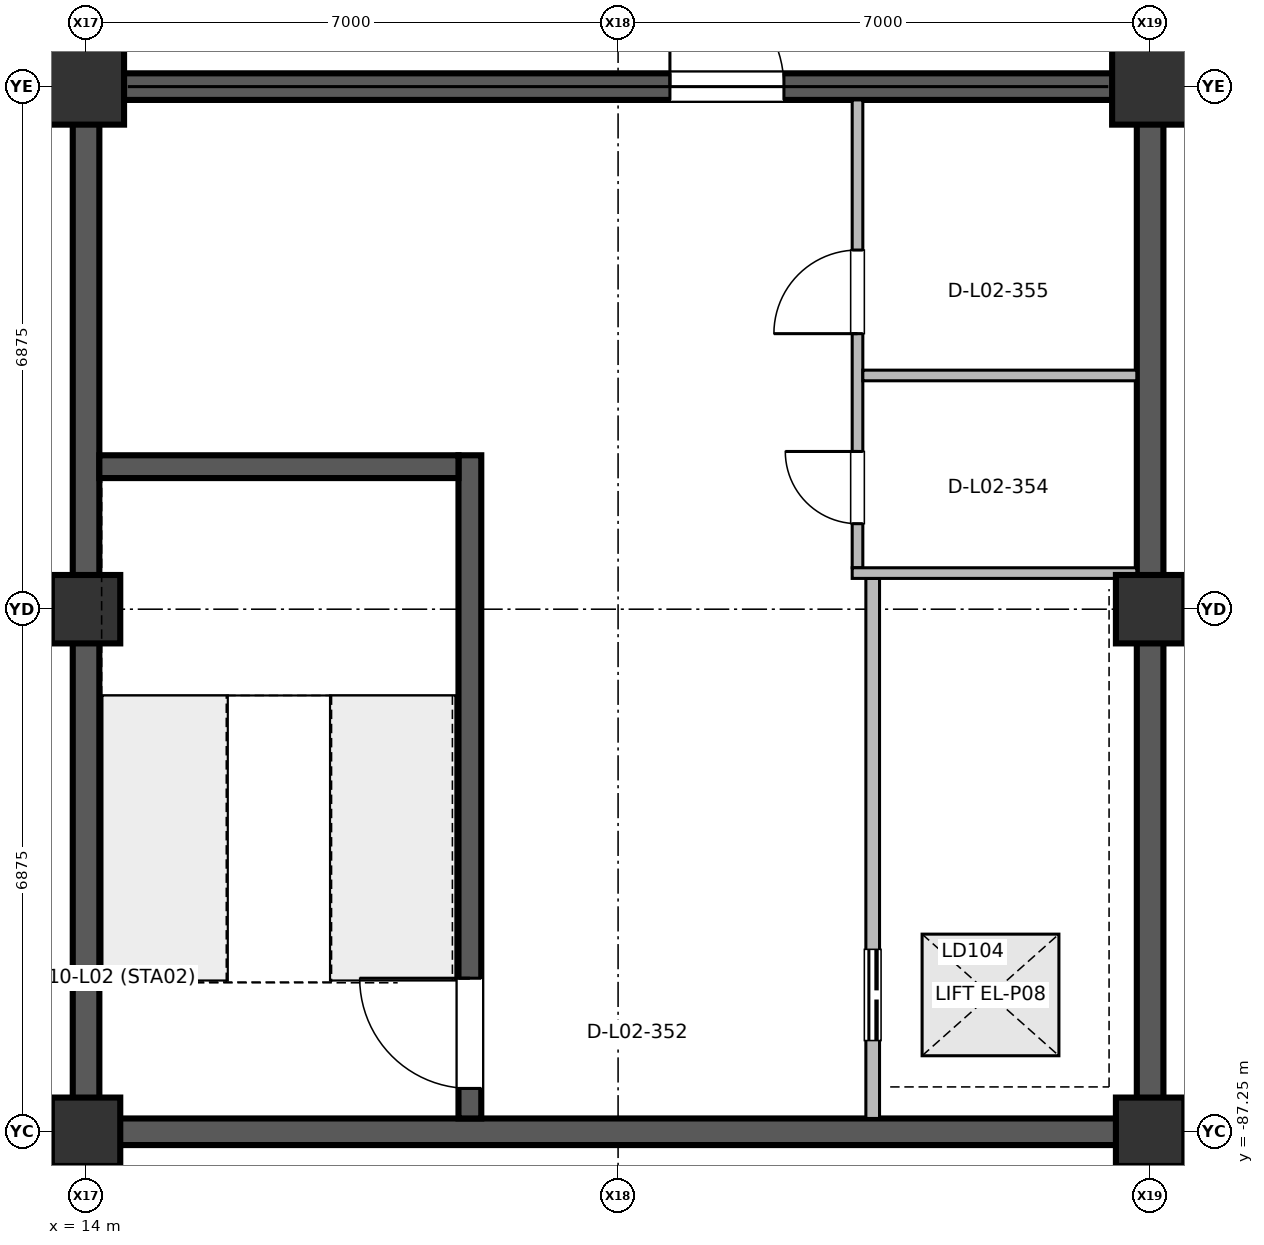
"""IFC4 building model, lengths in metres.
Left out: names, types, materials, properties, quantities, classifications, styles, units other than length and angle.
Written with IfcOpenShell. Run it as: python <this file> out.ifc"""

import sys

from ifc_helpers import new_model, si_unit, direction, frame, frame_2d, origin, origin_2d, place, context, subcontext, project, spatial, rectangle, extrude, element, fill, save


model = new_model("IFC4")
c1 = context("Model", 3, precision=1e-05, world=origin(), true_north=direction((0.0, 1.0)))
c2 = subcontext(c1, "Body", "Model", "MODEL_VIEW")
j1 = project(units=[si_unit("LENGTHUNIT", "METRE"), si_unit("PLANEANGLEUNIT", "RADIAN")], contexts=[c1])
p1 = place(None, origin())
s1 = spatial("IfcSite", under=j1, at=p1, CompositionType="ELEMENT")
p2 = place(p1, origin())
s2 = spatial("IfcBuilding", under=s1, at=p2, CompositionType="ELEMENT")
p3 = place(p2, frame((0.0, 0.0, 6.0)))
s3 = spatial("IfcBuildingStorey", under=s2, at=p3, CompositionType="ELEMENT", Elevation=6.0)
for number, where, z_axis, x_axis in (
    (1, (14.0, -87.25, 0.0), (0.0, 0.0, 1.0), (1.0, 0.0, 0.0)),
    (2, (14.0, -80.375, 0.0), (0.0, 0.0, 1.0), (1.0, 0.0, 0.0)),
):
    element("IfcColumn", number, at=place(p3, frame(where, z_axis=z_axis, x_axis=x_axis)), inside=s3, PredefinedType="COLUMN", context=c2, shape_type="SweptSolid", body=[
        extrude(rectangle(XDim=0.9, YDim=0.9, at=origin_2d()), origin(), (0.0, 0.0, 1.0), 5.398),
    ])
p4 = place(p3, frame((14.0, -73.5, 0.0), z_axis=(0.0, 0.0, 1.0), x_axis=(1.0, 0.0, 0.0)))
e3 = element("IfcColumn", 3, at=p4, inside=s3, PredefinedType="COLUMN", context=c2, shape_type="SweptSolid", body=[
    extrude(rectangle(XDim=1.0, YDim=1.0, at=origin_2d()), origin(), (0.0, 0.0, 1.0), 5.398),
])
for number, where, z_axis, x_axis in (
    (4, (28.0, -87.25, 0.0), (0.0, 0.0, 1.0), (1.0, 0.0, 0.0)),
    (5, (28.0, -80.375, 0.0), (0.0, 0.0, 1.0), (1.0, 0.0, 0.0)),
):
    element("IfcColumn", number, at=place(p3, frame(where, z_axis=z_axis, x_axis=x_axis)), inside=s3, PredefinedType="COLUMN", context=c2, shape_type="SweptSolid", body=[
        extrude(rectangle(XDim=0.9, YDim=0.9, at=origin_2d()), origin(), (0.0, 0.0, 1.0), 5.398),
    ])
p5 = place(p3, frame((28.0, -73.5, 0.0), z_axis=(0.0, 0.0, 1.0), x_axis=(1.0, 0.0, 0.0)))
e6 = element("IfcColumn", 6, at=p5, inside=s3, PredefinedType="COLUMN", context=c2, shape_type="SweptSolid", body=[
    extrude(rectangle(XDim=1.0, YDim=1.0, at=origin_2d()), origin(), (0.0, 0.0, 1.0), 5.398),
])
for number, where, z_axis, x_axis in (
    (7, (14.0, -87.075, 0.0), (0.0, 0.0, 1.0), (0.0, 1.0, 0.0)),
    (8, (28.0, -87.075, 0.0), (0.0, 0.0, 1.0), (0.0, 1.0, 0.0)),
):
    element("IfcWall", number, at=place(p3, frame(where, z_axis=z_axis, x_axis=x_axis)), inside=s3, PredefinedType="SHEAR", context=c2, shape_type="SweptSolid", body=[
        extrude(rectangle(XDim=13.4, YDim=0.35, at=frame_2d((6.7, 0.0))), origin(), (0.0, 0.0, 1.0), 5.2),
    ])
p6 = place(p3, frame((14.175, -87.25, 0.0), z_axis=(0.0, 0.0, 1.0), x_axis=(1.0, 0.0, 0.0)))
e9 = element("IfcWall", 9, at=p6, inside=s3, PredefinedType="SHEAR", context=c2, shape_type="SweptSolid", body=[
    extrude(rectangle(XDim=13.65, YDim=0.35, at=frame_2d((6.825, 0.0))), origin(), (0.0, 0.0, 1.0), 5.2),
])
p7 = place(p3, frame((14.175, -73.5, 0.0), z_axis=(0.0, 0.0, 1.0), x_axis=(1.0, 0.0, 0.0)))
e10 = element("IfcWall", 10, at=p7, inside=s3, PredefinedType="SHEAR", context=c2, shape_type="SweptSolid", body=[
    extrude(rectangle(XDim=13.65, YDim=0.35, at=frame_2d((6.825, 0.0))), origin(), (0.0, 0.0, 1.0), 5.2),
])
p8 = place(p7, frame((7.507, 0.0, 0.0)))
e11 = element("IfcOpeningElement", 11, at=p8, cuts=e10, PredefinedType="OPENING", context=c2, shape_type="SweptSolid", body=[
    extrude(rectangle(XDim=1.5, YDim=2.2, at=frame_2d((0.75, 1.1))), frame((0.0, 0.185, 0.0), z_axis=(0.0, -1.0, 0.0), x_axis=(1.0, 0.0, 0.0)), (0.0, 0.0, 1.0), 0.37),
])
p9 = place(p3, frame((19.05, -87.075, 0.0), z_axis=(0.0, 0.0, 1.0), x_axis=(0.0, 1.0, 0.0)))
e12 = element("IfcWall", 12, at=p9, inside=s3, PredefinedType="SHEAR", context=c2, shape_type="SweptSolid", body=[
    extrude(rectangle(XDim=8.725, YDim=0.3, at=frame_2d((4.362, 0.0))), origin(), (0.0, 0.0, 1.0), 5.2),
])
p10 = place(p9, frame((0.395, 0.0, 0.0)))
e13 = element("IfcOpeningElement", 13, at=p10, cuts=e12, PredefinedType="OPENING", context=c2, shape_type="SweptSolid", body=[
    extrude(rectangle(XDim=1.45, YDim=2.2, at=frame_2d((0.725, 1.1))), frame((0.0, 0.16, 0.0), z_axis=(0.0, -1.0, 0.0), x_axis=(1.0, 0.0, 0.0)), (0.0, 0.0, 1.0), 0.32),
])
p11 = place(p3, frame((24.35, -87.075, 0.0), z_axis=(0.0, 0.0, 1.0), x_axis=(0.0, 1.0, 0.0)))
e14 = element("IfcWall", 14, at=p11, inside=s3, PredefinedType="PARTITIONING", context=c2, shape_type="SweptSolid", body=[
    extrude(rectangle(XDim=7.105, YDim=0.18, at=frame_2d((3.552, 0.0))), origin(), (0.0, 0.0, 1.0), 4.42),
])
p12 = place(p11, frame((1.025, 0.0, 0.0)))
e15 = element("IfcOpeningElement", 15, at=p12, cuts=e14, PredefinedType="OPENING", context=c2, shape_type="SweptSolid", body=[
    extrude(rectangle(XDim=1.2, YDim=2.25, at=frame_2d((0.6, 1.125))), frame((0.0, 0.1, 0.0), z_axis=(0.0, -1.0, 0.0), x_axis=(1.0, 0.0, 0.0)), (0.0, 0.0, 1.0), 0.2),
])
p13 = place(p3, frame((24.15, -79.83, 0.0), z_axis=(0.0, 0.0, 1.0), x_axis=(0.0, 1.0, 0.0)))
e16 = element("IfcWall", 16, at=p13, inside=s3, PredefinedType="PARTITIONING", context=c2, shape_type="SweptSolid", body=[
    extrude(rectangle(XDim=6.155, YDim=0.14, at=frame_2d((3.078, 0.0))), origin(), (0.0, 0.0, 1.0), 4.42),
])
p14 = place(p13, frame((0.58, 0.0, 0.0)))
e17 = element("IfcOpeningElement", 17, at=p14, cuts=e16, PredefinedType="OPENING", context=c2, shape_type="SweptSolid", body=[
    extrude(rectangle(XDim=0.95, YDim=2.15, at=frame_2d((0.475, 1.075))), frame((0.0, 0.08, 0.0), z_axis=(0.0, -1.0, 0.0), x_axis=(1.0, 0.0, 0.0)), (0.0, 0.0, 1.0), 0.16),
])
p15 = place(p13, frame((3.08, 0.0, 0.0)))
e18 = element("IfcOpeningElement", 18, at=p15, cuts=e16, PredefinedType="OPENING", context=c2, shape_type="SweptSolid", body=[
    extrude(rectangle(XDim=1.1, YDim=2.15, at=frame_2d((0.55, 1.075))), frame((0.0, 0.08, 0.0), z_axis=(0.0, -1.0, 0.0), x_axis=(1.0, 0.0, 0.0)), (0.0, 0.0, 1.0), 0.16),
])
p16 = place(p3, frame((24.08, -79.9, 0.0), z_axis=(0.0, 0.0, 1.0), x_axis=(1.0, 0.0, 0.0)))
e19 = element("IfcWall", 19, at=p16, inside=s3, PredefinedType="PARTITIONING", context=c2, shape_type="SweptSolid", body=[
    extrude(rectangle(XDim=3.745, YDim=0.14, at=frame_2d((1.873, 0.0))), origin(), (0.0, 0.0, 1.0), 4.42),
])
p17 = place(p3, frame((24.22, -77.3, 0.0), z_axis=(0.0, 0.0, 1.0), x_axis=(1.0, 0.0, 0.0)))
e20 = element("IfcWall", 20, at=p17, inside=s3, PredefinedType="PARTITIONING", context=c2, shape_type="SweptSolid", body=[
    extrude(rectangle(XDim=3.605, YDim=0.14, at=frame_2d((1.802, 0.0))), origin(), (0.0, 0.0, 1.0), 4.42),
])
p18 = place(p3, frame((14.175, -78.5, 0.0), z_axis=(0.0, 0.0, 1.0), x_axis=(1.0, 0.0, 0.0)))
e21 = element("IfcWall", 21, at=p18, inside=s3, PredefinedType="SHEAR", context=c2, shape_type="SweptSolid", body=[
    extrude(rectangle(XDim=4.725, YDim=0.3, at=frame_2d((2.362, 0.0))), origin(), (0.0, 0.0, 1.0), 5.2),
])
p19 = place(p8, origin())
e22 = element("IfcDoor", 22, at=p19, inside=s3, OperationType="SINGLE_SWING_LEFT", PredefinedType="DOOR", context=c2, shape_type="SweptSolid", body=[
    extrude(rectangle(XDim=1.5, YDim=2.2, at=frame_2d((0.75, 1.1))), frame((0.0, 0.025, 0.0), z_axis=(0.0, -1.0, 0.0), x_axis=(1.0, 0.0, 0.0)), (0.0, 0.0, 1.0), 0.05),
])
fill(e11, e22)
p20 = place(p10, origin())
e23 = element("IfcDoor", 23, at=p20, inside=s3, OperationType="SINGLE_SWING_RIGHT", PredefinedType="DOOR", context=c2, shape_type="SweptSolid", body=[
    extrude(rectangle(XDim=1.45, YDim=2.2, at=frame_2d((0.725, 1.1))), frame((0.0, 0.025, 0.0), z_axis=(0.0, -1.0, 0.0), x_axis=(1.0, 0.0, 0.0)), (0.0, 0.0, 1.0), 0.05),
])
fill(e13, e23)
p21 = place(p12, origin())
e24 = element("IfcDoor", 24, at=p21, inside=s3, OperationType="DOUBLE_DOOR_SLIDING", PredefinedType="DOOR", context=c2, shape_type="SweptSolid", body=[
    extrude(rectangle(XDim=1.2, YDim=2.25, at=frame_2d((0.6, 1.125))), frame((0.0, 0.025, 0.0), z_axis=(0.0, -1.0, 0.0), x_axis=(1.0, 0.0, 0.0)), (0.0, 0.0, 1.0), 0.05),
])
fill(e15, e24)
p22 = place(p14, origin())
e25 = element("IfcDoor", 25, at=p22, inside=s3, OperationType="SINGLE_SWING_RIGHT", PredefinedType="DOOR", context=c2, shape_type="SweptSolid", body=[
    extrude(rectangle(XDim=0.95, YDim=2.15, at=frame_2d((0.475, 1.075))), frame((0.0, 0.025, 0.0), z_axis=(0.0, -1.0, 0.0), x_axis=(1.0, 0.0, 0.0)), (0.0, 0.0, 1.0), 0.05),
])
fill(e17, e25)
p23 = place(p15, origin())
e26 = element("IfcDoor", 26, at=p23, inside=s3, OperationType="SINGLE_SWING_LEFT", PredefinedType="DOOR", context=c2, shape_type="SweptSolid", body=[
    extrude(rectangle(XDim=1.1, YDim=2.15, at=frame_2d((0.55, 1.075))), frame((0.0, 0.025, 0.0), z_axis=(0.0, -1.0, 0.0), x_axis=(1.0, 0.0, 0.0)), (0.0, 0.0, 1.0), 0.05),
])
fill(e18, e26)
save(model, sys.argv[1])
